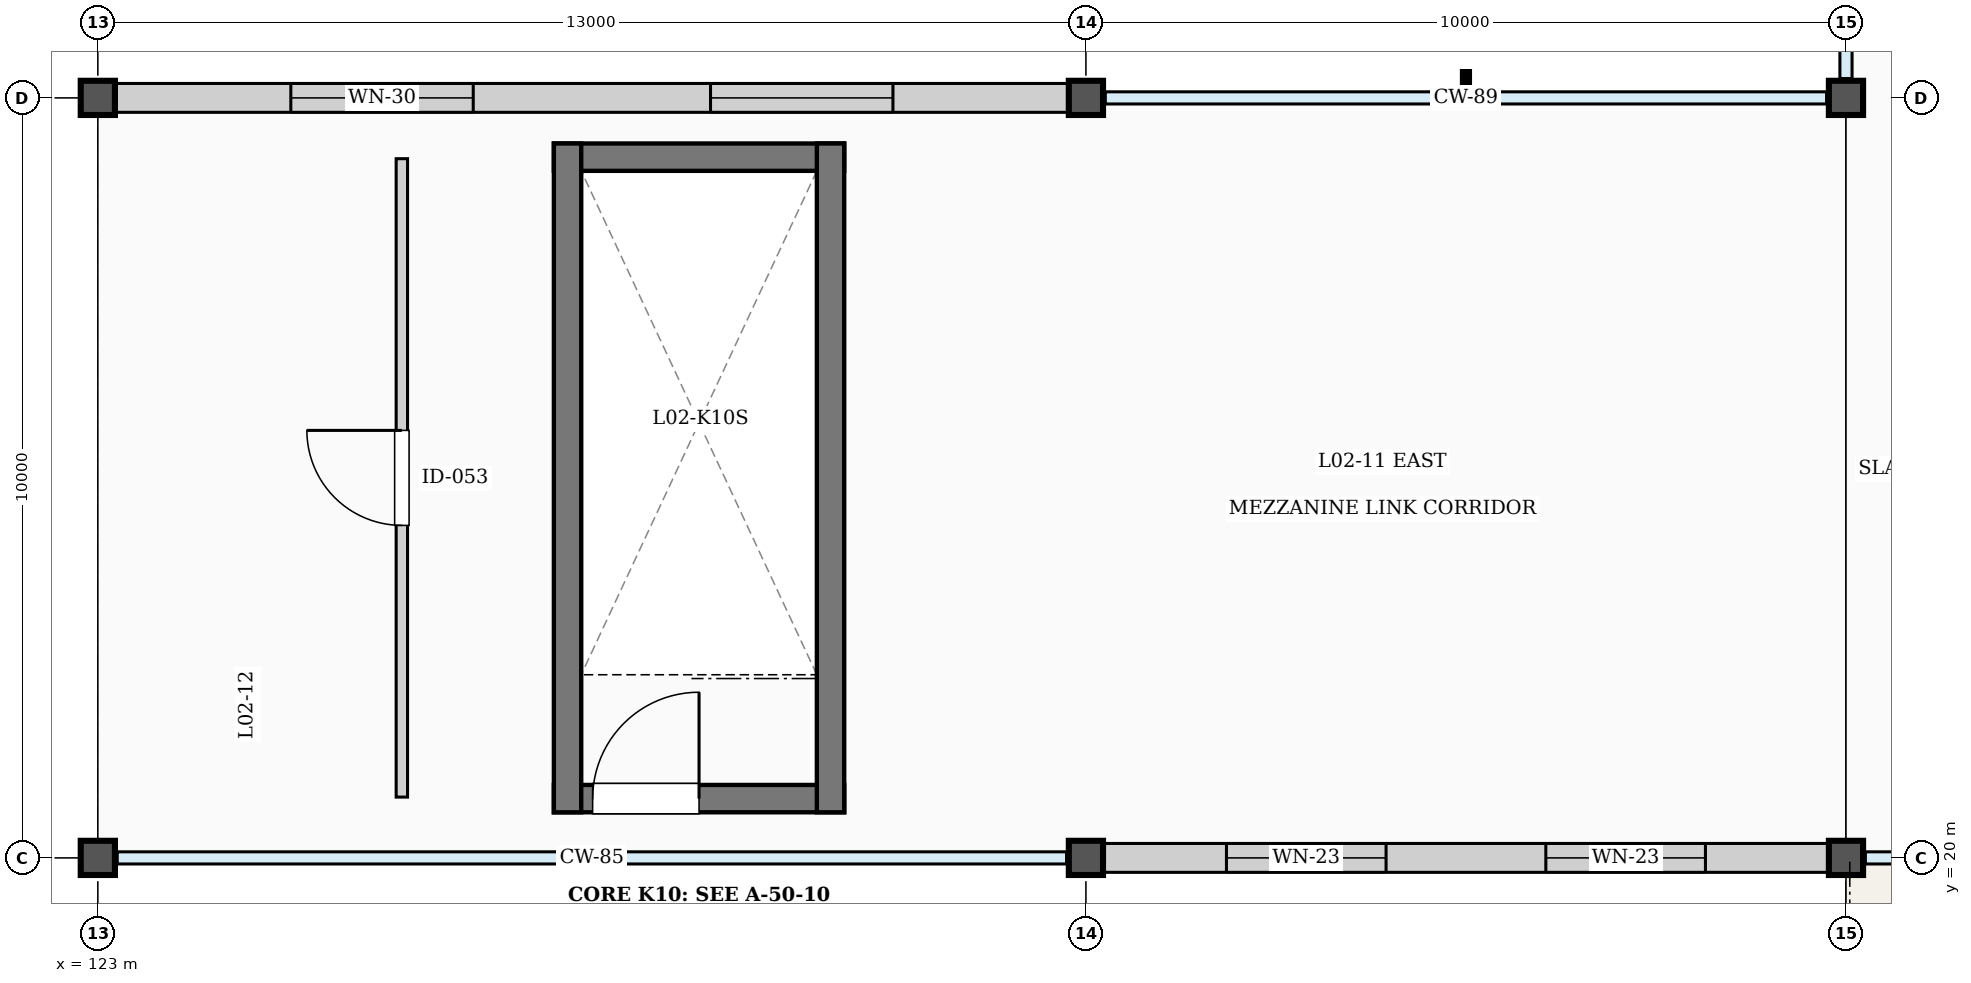
"""IFC4 building model, lengths in metres.
Left out: names, types, materials, properties, quantities, classifications, styles, units other than length and angle.
Written with IfcOpenShell. Run it as: python <this file> out.ifc"""

import sys

from ifc_helpers import new_model, si_unit, direction, frame, frame_2d, origin, origin_2d, place, context, subcontext, project, spatial, rectangle, extrude, element, fill, save


model = new_model("IFC4")
c1 = context("Model", 3, precision=1e-05, world=origin(), true_north=direction((0.0, 1.0)))
c2 = subcontext(c1, "Body", "Model", "MODEL_VIEW")
j1 = project(units=[si_unit("LENGTHUNIT", "METRE"), si_unit("PLANEANGLEUNIT", "RADIAN")], contexts=[c1])
p1 = place(None, origin())
s1 = spatial("IfcSite", under=j1, at=p1, CompositionType="ELEMENT")
p2 = place(p1, origin())
s2 = spatial("IfcBuilding", under=s1, at=p2, CompositionType="ELEMENT")
p3 = place(p2, frame((0.0, 0.0, 10.2)))
s3 = spatial("IfcBuildingStorey", under=s2, at=p3, CompositionType="ELEMENT", Elevation=10.2)
for number, where, z_axis, x_axis in (
    (1, (123.0, 20.0, 0.0), (0.0, 0.0, 1.0), (1.0, 0.0, 0.0)),
    (2, (123.0, 30.0, 0.0), (0.0, 0.0, 1.0), (1.0, 0.0, 0.0)),
    (3, (136.0, 20.0, 0.0), (0.0, 0.0, 1.0), (1.0, 0.0, 0.0)),
    (4, (136.0, 30.0, 0.0), (0.0, 0.0, 1.0), (1.0, 0.0, 0.0)),
    (5, (146.0, 20.0, 0.0), (0.0, 0.0, 1.0), (1.0, 0.0, 0.0)),
    (6, (146.0, 30.0, 0.0), (0.0, 0.0, 1.0), (1.0, 0.0, 0.0)),
):
    element("IfcColumn", number, at=place(p3, frame(where, z_axis=z_axis, x_axis=x_axis)), inside=s3, PredefinedType="COLUMN", context=c2, shape_type="SweptSolid", body=[
        extrude(rectangle(XDim=0.45, YDim=0.45, at=origin_2d()), origin(), (0.0, 0.0, 1.0), 4.2),
    ])
p4 = place(p3, frame((136.225, 20.0, 0.0), z_axis=(0.0, 0.0, 1.0), x_axis=(1.0, 0.0, 0.0)))
e7 = element("IfcWall", 7, at=p4, inside=s3, PredefinedType="SOLIDWALL", context=c2, shape_type="SweptSolid", body=[
    extrude(rectangle(XDim=9.55, YDim=0.38, at=frame_2d((4.775, 0.0))), origin(), (0.0, 0.0, 1.0), 3.63),
])
p5 = place(p4, frame((1.624, 0.0, 0.9)))
e8 = element("IfcOpeningElement", 8, at=p5, cuts=e7, PredefinedType="OPENING", context=c2, shape_type="SweptSolid", body=[
    extrude(rectangle(XDim=2.1, YDim=1.5, at=frame_2d((1.05, 0.75))), frame((0.0, 0.2, 0.0), z_axis=(0.0, -1.0, 0.0), x_axis=(1.0, 0.0, 0.0)), (0.0, 0.0, 1.0), 0.4),
])
p6 = place(p4, frame((5.826, 0.0, 0.9)))
e9 = element("IfcOpeningElement", 9, at=p6, cuts=e7, PredefinedType="OPENING", context=c2, shape_type="SweptSolid", body=[
    extrude(rectangle(XDim=2.1, YDim=1.5, at=frame_2d((1.05, 0.75))), frame((0.0, 0.2, 0.0), z_axis=(0.0, -1.0, 0.0), x_axis=(1.0, 0.0, 0.0)), (0.0, 0.0, 1.0), 0.4),
])
p7 = place(p3, frame((123.225, 30.0, 0.0), z_axis=(0.0, 0.0, 1.0), x_axis=(1.0, 0.0, 0.0)))
e10 = element("IfcWall", 10, at=p7, inside=s3, PredefinedType="SOLIDWALL", context=c2, shape_type="SweptSolid", body=[
    extrude(rectangle(XDim=12.55, YDim=0.38, at=frame_2d((6.275, 0.0))), origin(), (0.0, 0.0, 1.0), 3.28),
])
p8 = place(p7, frame((2.314, 0.0, 0.9)))
e11 = element("IfcOpeningElement", 11, at=p8, cuts=e10, PredefinedType="OPENING", context=c2, shape_type="SweptSolid", body=[
    extrude(rectangle(XDim=2.4, YDim=1.8, at=frame_2d((1.2, 0.9))), frame((0.0, 0.2, 0.0), z_axis=(0.0, -1.0, 0.0), x_axis=(1.0, 0.0, 0.0)), (0.0, 0.0, 1.0), 0.4),
])
p9 = place(p7, frame((7.836, 0.0, 0.9)))
e12 = element("IfcOpeningElement", 12, at=p9, cuts=e10, PredefinedType="OPENING", context=c2, shape_type="SweptSolid", body=[
    extrude(rectangle(XDim=2.4, YDim=1.8, at=frame_2d((1.2, 0.9))), frame((0.0, 0.2, 0.0), z_axis=(0.0, -1.0, 0.0), x_axis=(1.0, 0.0, 0.0)), (0.0, 0.0, 1.0), 0.4),
])
p10 = place(p3, frame((129.0, 20.78, 0.0), z_axis=(0.0, 0.0, 1.0), x_axis=(1.0, 0.0, 0.0)))
e13 = element("IfcWall", 13, at=p10, inside=s3, PredefinedType="SHEAR", context=c2, shape_type="SweptSolid", body=[
    extrude(rectangle(XDim=3.82, YDim=0.36, at=frame_2d((1.91, 0.0))), origin(), (0.0, 0.0, 1.0), 4.2),
])
p11 = place(p10, frame((0.51, 0.0, 0.0)))
e14 = element("IfcOpeningElement", 14, at=p11, cuts=e13, PredefinedType="OPENING", context=c2, shape_type="SweptSolid", body=[
    extrude(rectangle(XDim=1.4, YDim=2.35, at=frame_2d((0.7, 1.175))), frame((0.0, 0.19, 0.0), z_axis=(0.0, -1.0, 0.0), x_axis=(1.0, 0.0, 0.0)), (0.0, 0.0, 1.0), 0.38),
])
p12 = place(p3, frame((129.0, 29.22, 0.0), z_axis=(0.0, 0.0, 1.0), x_axis=(1.0, 0.0, 0.0)))
e15 = element("IfcWall", 15, at=p12, inside=s3, PredefinedType="SHEAR", context=c2, shape_type="SweptSolid", body=[
    extrude(rectangle(XDim=3.82, YDim=0.36, at=frame_2d((1.91, 0.0))), origin(), (0.0, 0.0, 1.0), 4.2),
])
for number, where, z_axis, x_axis in (
    (16, (129.18, 20.6, 0.0), (0.0, 0.0, 1.0), (0.0, 1.0, 0.0)),
    (17, (132.64, 20.6, 0.0), (0.0, 0.0, 1.0), (0.0, 1.0, 0.0)),
):
    element("IfcWall", number, at=place(p3, frame(where, z_axis=z_axis, x_axis=x_axis)), inside=s3, PredefinedType="SHEAR", context=c2, shape_type="SweptSolid", body=[
        extrude(rectangle(XDim=8.8, YDim=0.36, at=frame_2d((4.4, 0.0))), origin(), (0.0, 0.0, 1.0), 4.2),
    ])
p13 = place(p3, frame((127.0, 20.8, 0.0), z_axis=(0.0, 0.0, 1.0), x_axis=(0.0, 1.0, 0.0)))
e18 = element("IfcWall", 18, at=p13, inside=s3, PredefinedType="PARTITIONING", context=c2, shape_type="SweptSolid", body=[
    extrude(rectangle(XDim=8.4, YDim=0.15, at=frame_2d((4.2, 0.0))), origin(), (0.0, 0.0, 1.0), 3.86),
])
p14 = place(p13, frame((3.575, 0.0, 0.0)))
e19 = element("IfcOpeningElement", 19, at=p14, cuts=e18, PredefinedType="OPENING", context=c2, shape_type="SweptSolid", body=[
    extrude(rectangle(XDim=1.25, YDim=2.4, at=frame_2d((0.625, 1.2))), frame((0.0, 0.085, 0.0), z_axis=(0.0, -1.0, 0.0), x_axis=(1.0, 0.0, 0.0)), (0.0, 0.0, 1.0), 0.17),
])
p15 = place(p5, origin())
e20 = element("IfcWindow", 20, at=p15, inside=s3, PartitioningType="SINGLE_PANEL", PredefinedType="WINDOW", context=c2, shape_type="SweptSolid", body=[
    extrude(rectangle(XDim=2.1, YDim=1.5, at=frame_2d((1.05, 0.75))), frame((0.0, 0.03, 0.0), z_axis=(0.0, -1.0, 0.0), x_axis=(1.0, 0.0, 0.0)), (0.0, 0.0, 1.0), 0.06),
])
fill(e8, e20)
p16 = place(p6, origin())
e21 = element("IfcWindow", 21, at=p16, inside=s3, PartitioningType="SINGLE_PANEL", PredefinedType="WINDOW", context=c2, shape_type="SweptSolid", body=[
    extrude(rectangle(XDim=2.1, YDim=1.5, at=frame_2d((1.05, 0.75))), frame((0.0, 0.03, 0.0), z_axis=(0.0, -1.0, 0.0), x_axis=(1.0, 0.0, 0.0)), (0.0, 0.0, 1.0), 0.06),
])
fill(e9, e21)
p17 = place(p8, origin())
e22 = element("IfcWindow", 22, at=p17, inside=s3, PartitioningType="SINGLE_PANEL", PredefinedType="WINDOW", context=c2, shape_type="SweptSolid", body=[
    extrude(rectangle(XDim=2.4, YDim=1.8, at=frame_2d((1.2, 0.9))), frame((0.0, 0.03, 0.0), z_axis=(0.0, -1.0, 0.0), x_axis=(1.0, 0.0, 0.0)), (0.0, 0.0, 1.0), 0.06),
])
fill(e11, e22)
p18 = place(p9, origin())
e23 = element("IfcWindow", 23, at=p18, inside=s3, PartitioningType="SINGLE_PANEL", PredefinedType="WINDOW", context=c2, shape_type="SweptSolid", body=[
    extrude(rectangle(XDim=2.4, YDim=1.8, at=frame_2d((1.2, 0.9))), frame((0.0, 0.03, 0.0), z_axis=(0.0, -1.0, 0.0), x_axis=(1.0, 0.0, 0.0)), (0.0, 0.0, 1.0), 0.06),
])
fill(e12, e23)
p19 = place(p11, origin())
e24 = element("IfcDoor", 24, at=p19, inside=s3, OperationType="SINGLE_SWING_RIGHT", PredefinedType="DOOR", context=c2, shape_type="SweptSolid", body=[
    extrude(rectangle(XDim=1.4, YDim=2.35, at=frame_2d((0.7, 1.175))), frame((0.0, 0.025, 0.0), z_axis=(0.0, -1.0, 0.0), x_axis=(1.0, 0.0, 0.0)), (0.0, 0.0, 1.0), 0.05),
])
fill(e14, e24)
p20 = place(p14, origin())
e25 = element("IfcDoor", 25, at=p20, inside=s3, OperationType="SINGLE_SWING_RIGHT", PredefinedType="DOOR", context=c2, shape_type="SweptSolid", body=[
    extrude(rectangle(XDim=1.25, YDim=2.4, at=frame_2d((0.625, 1.2))), frame((0.0, 0.025, 0.0), z_axis=(0.0, -1.0, 0.0), x_axis=(1.0, 0.0, 0.0)), (0.0, 0.0, 1.0), 0.05),
])
fill(e19, e25)
save(model, sys.argv[1])
